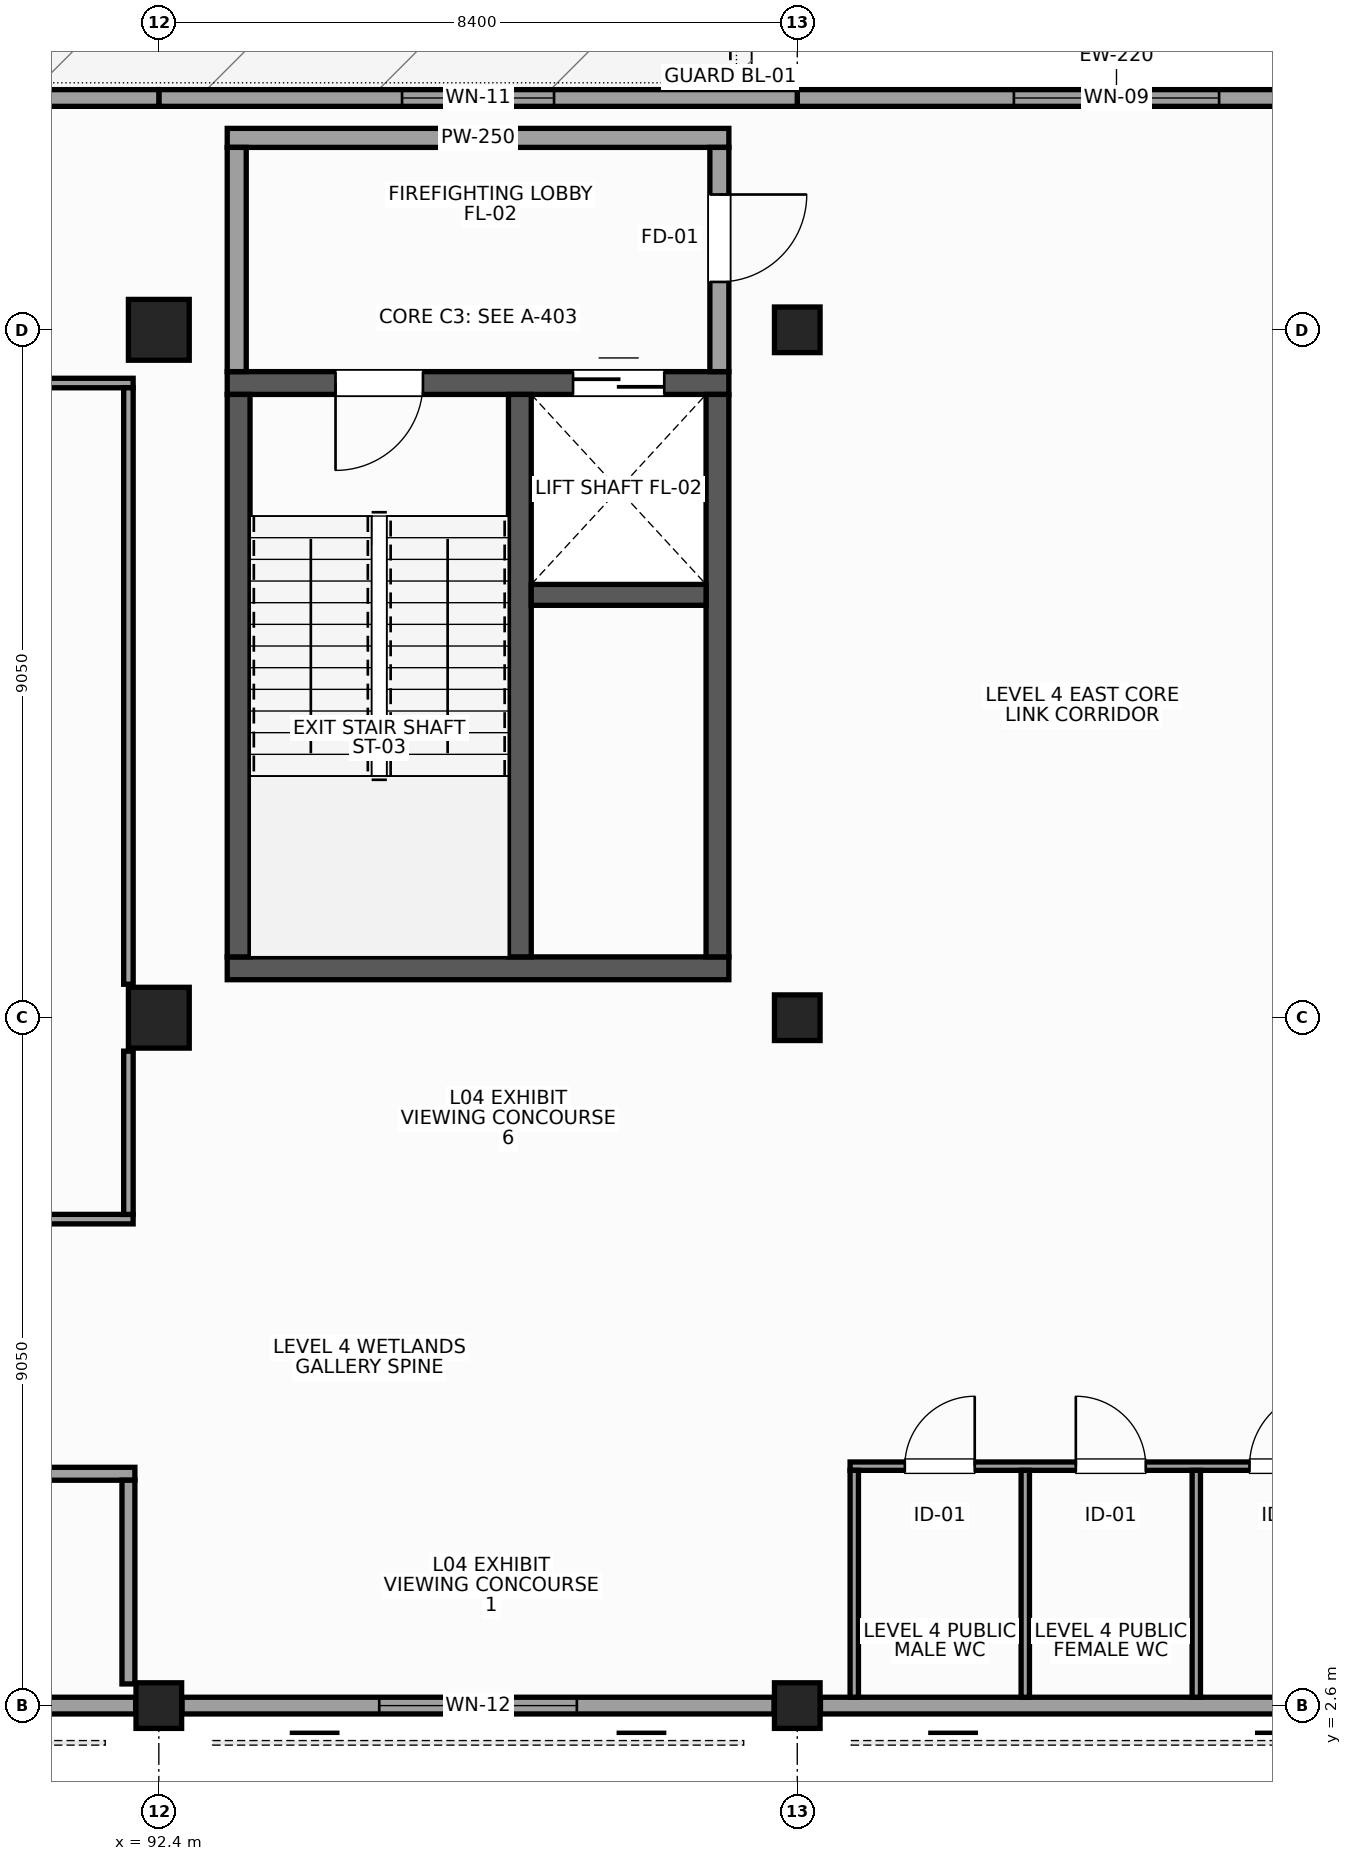
"""IFC4 building model, lengths in metres.
Left out: names, types, materials, properties, quantities, classifications, styles, units other than length and angle.
Written with IfcOpenShell. Run it as: python <this file> out.ifc"""

import sys

from ifc_helpers import new_model, si_unit, direction, frame, frame_2d, origin, origin_2d, place, context, subcontext, project, spatial, rectangle, extrude, element, fill, save


model = new_model("IFC4")
c1 = context("Model", 3, precision=1e-05, world=origin(), true_north=direction((0.0, 1.0)))
c2 = subcontext(c1, "Body", "Model", "MODEL_VIEW")
j1 = project(units=[si_unit("LENGTHUNIT", "METRE"), si_unit("PLANEANGLEUNIT", "RADIAN")], contexts=[c1])
p1 = place(None, origin())
s1 = spatial("IfcSite", under=j1, at=p1, CompositionType="ELEMENT")
p2 = place(p1, origin())
s2 = spatial("IfcBuilding", under=s1, at=p2, CompositionType="ELEMENT")
p3 = place(p2, frame((0.0, 0.0, 20.1)))
s3 = spatial("IfcBuildingStorey", under=s2, at=p3, CompositionType="ELEMENT", Elevation=20.1)
p4 = place(p3, frame((92.4, 2.6, 0.0), z_axis=(0.0, 0.0, 1.0), x_axis=(1.0, 0.0, 0.0)))
e1 = element("IfcColumn", 1, at=p4, inside=s3, PredefinedType="COLUMN", context=c2, shape_type="SweptSolid", body=[
    extrude(rectangle(XDim=0.6, YDim=0.6, at=origin_2d()), origin(), (0.0, 0.0, 1.0), 4.5),
])
p5 = place(p3, frame((92.4, 11.65, 0.0), z_axis=(0.0, 0.0, 1.0), x_axis=(1.0, 0.0, 0.0)))
e2 = element("IfcColumn", 2, at=p5, inside=s3, PredefinedType="COLUMN", context=c2, shape_type="SweptSolid", body=[
    extrude(rectangle(XDim=0.8, YDim=0.8, at=origin_2d()), origin(), (0.0, 0.0, 1.0), 3.75),
])
p6 = place(p3, frame((92.4, 20.7, 0.0), z_axis=(0.0, 0.0, 1.0), x_axis=(1.0, 0.0, 0.0)))
e3 = element("IfcColumn", 3, at=p6, inside=s3, PredefinedType="COLUMN", context=c2, shape_type="SweptSolid", body=[
    extrude(rectangle(XDim=0.8, YDim=0.8, at=origin_2d()), origin(), (0.0, 0.0, 1.0), 4.2),
])
for number, where, z_axis, x_axis in (
    (4, (100.8, 2.6, 0.0), (0.0, 0.0, 1.0), (1.0, 0.0, 0.0)),
    (5, (100.8, 11.65, 0.0), (0.0, 0.0, 1.0), (1.0, 0.0, 0.0)),
    (6, (100.8, 20.7, 0.0), (0.0, 0.0, 1.0), (1.0, 0.0, 0.0)),
):
    element("IfcColumn", number, at=place(p3, frame(where, z_axis=z_axis, x_axis=x_axis)), inside=s3, PredefinedType="COLUMN", context=c2, shape_type="SweptSolid", body=[
        extrude(rectangle(XDim=0.6, YDim=0.6, at=origin_2d()), origin(), (0.0, 0.0, 1.0), 4.5),
    ])
p7 = place(p3, frame((84.305, 2.6, 0.0), z_axis=(0.0, 0.0, 1.0), x_axis=(1.0, 0.0, 0.0)))
e7 = element("IfcWall", 7, at=p7, inside=s3, PredefinedType="STANDARD", context=c2, shape_type="SweptSolid", body=[
    extrude(rectangle(XDim=7.79, YDim=0.22, at=frame_2d((3.895, 0.0))), origin(), (0.0, 0.0, 1.0), 4.2),
])
p8 = place(p7, frame((3.195, 0.0, 0.95)))
e8 = element("IfcOpeningElement", 8, at=p8, cuts=e7, PredefinedType="OPENING", context=c2, shape_type="SweptSolid", body=[
    extrude(rectangle(XDim=1.4, YDim=1.6, at=frame_2d((0.7, 0.8))), frame((0.0, 0.12, 0.0), z_axis=(0.0, -1.0, 0.0), x_axis=(1.0, 0.0, 0.0)), (0.0, 0.0, 1.0), 0.24),
])
p9 = place(p3, frame((92.705, 2.6, 0.0), z_axis=(0.0, 0.0, 1.0), x_axis=(1.0, 0.0, 0.0)))
e9 = element("IfcWall", 9, at=p9, inside=s3, PredefinedType="STANDARD", context=c2, shape_type="SweptSolid", body=[
    extrude(rectangle(XDim=7.79, YDim=0.22, at=frame_2d((3.895, 0.0))), origin(), (0.0, 0.0, 1.0), 4.2),
])
p10 = place(p9, frame((2.595, 0.0, 0.95)))
e10 = element("IfcOpeningElement", 10, at=p10, cuts=e9, PredefinedType="OPENING", context=c2, shape_type="SweptSolid", body=[
    extrude(rectangle(XDim=2.6, YDim=1.6, at=frame_2d((1.3, 0.8))), frame((0.0, 0.12, 0.0), z_axis=(0.0, -1.0, 0.0), x_axis=(1.0, 0.0, 0.0)), (0.0, 0.0, 1.0), 0.24),
])
p11 = place(p3, frame((101.105, 2.6, 0.0), z_axis=(0.0, 0.0, 1.0), x_axis=(1.0, 0.0, 0.0)))
e11 = element("IfcWall", 11, at=p11, inside=s3, PredefinedType="STANDARD", context=c2, shape_type="SweptSolid", body=[
    extrude(rectangle(XDim=7.79, YDim=0.22, at=frame_2d((3.895, 0.0))), origin(), (0.0, 0.0, 1.0), 3.631),
])
p12 = place(p3, frame((109.2, 23.75, 0.0), z_axis=(0.0, 0.0, 1.0), x_axis=(-1.0, 0.0, 0.0)))
e12 = element("IfcWall", 12, at=p12, inside=s3, PredefinedType="STANDARD", context=c2, shape_type="SweptSolid", body=[
    extrude(rectangle(XDim=8.4, YDim=0.22, at=frame_2d((4.2, 0.0))), origin(), (0.0, 0.0, 1.0), 3.428),
])
p13 = place(p12, frame((2.85, 0.0, 0.95)))
e13 = element("IfcOpeningElement", 13, at=p13, cuts=e12, PredefinedType="OPENING", context=c2, shape_type="SweptSolid", body=[
    extrude(rectangle(XDim=2.7, YDim=2.0, at=frame_2d((1.35, 1.0))), frame((0.0, 0.12, 0.0), z_axis=(0.0, -1.0, 0.0), x_axis=(1.0, 0.0, 0.0)), (0.0, 0.0, 1.0), 0.24),
])
p14 = place(p3, frame((100.8, 23.75, 0.0), z_axis=(0.0, 0.0, 1.0), x_axis=(-1.0, 0.0, 0.0)))
e14 = element("IfcWall", 14, at=p14, inside=s3, PredefinedType="STANDARD", context=c2, shape_type="SweptSolid", body=[
    extrude(rectangle(XDim=8.4, YDim=0.22, at=frame_2d((4.2, 0.0))), origin(), (0.0, 0.0, 1.0), 3.428),
])
p15 = place(p14, frame((3.2, 0.0, 0.95)))
e15 = element("IfcOpeningElement", 15, at=p15, cuts=e14, PredefinedType="OPENING", context=c2, shape_type="SweptSolid", body=[
    extrude(rectangle(XDim=2.0, YDim=1.5, at=frame_2d((1.0, 0.75))), frame((0.0, 0.12, 0.0), z_axis=(0.0, -1.0, 0.0), x_axis=(1.0, 0.0, 0.0)), (0.0, 0.0, 1.0), 0.24),
])
p16 = place(p3, frame((92.4, 23.75, 0.0), z_axis=(0.0, 0.0, 1.0), x_axis=(-1.0, 0.0, 0.0)))
e16 = element("IfcWall", 16, at=p16, inside=s3, PredefinedType="STANDARD", context=c2, shape_type="SweptSolid", body=[
    extrude(rectangle(XDim=8.4, YDim=0.22, at=frame_2d((4.2, 0.0))), origin(), (0.0, 0.0, 1.0), 3.428),
])
p17 = place(p16, frame((3.4, 0.0, 0.0)))
e17 = element("IfcOpeningElement", 17, at=p17, cuts=e16, PredefinedType="OPENING", context=c2, shape_type="SweptSolid", body=[
    extrude(rectangle(XDim=1.6, YDim=2.25, at=frame_2d((0.8, 1.125))), frame((0.0, 0.12, 0.0), z_axis=(0.0, -1.0, 0.0), x_axis=(1.0, 0.0, 0.0)), (0.0, 0.0, 1.0), 0.24),
])
p18 = place(p3, frame((93.3, 12.3, 0.0), z_axis=(0.0, 0.0, 1.0), x_axis=(1.0, 0.0, 0.0)))
e18 = element("IfcWall", 18, at=p18, inside=s3, PredefinedType="SHEAR", context=c2, shape_type="SweptSolid", body=[
    extrude(rectangle(XDim=6.6, YDim=0.3, at=frame_2d((3.3, 0.0))), origin(), (0.0, 0.0, 1.0), 4.2),
])
p19 = place(p3, frame((93.3, 20.0, 0.0), z_axis=(0.0, 0.0, 1.0), x_axis=(1.0, 0.0, 0.0)))
e19 = element("IfcWall", 19, at=p19, inside=s3, PredefinedType="SHEAR", context=c2, shape_type="SweptSolid", body=[
    extrude(rectangle(XDim=6.6, YDim=0.3, at=frame_2d((3.3, 0.0))), origin(), (0.0, 0.0, 1.0), 4.2),
])
p20 = place(p19, frame((1.425, 0.0, 0.0)))
e20 = element("IfcOpeningElement", 20, at=p20, cuts=e19, PredefinedType="OPENING", context=c2, shape_type="SweptSolid", body=[
    extrude(rectangle(XDim=1.15, YDim=2.2, at=frame_2d((0.575, 1.1))), frame((0.0, 0.16, 0.0), z_axis=(0.0, -1.0, 0.0), x_axis=(1.0, 0.0, 0.0)), (0.0, 0.0, 1.0), 0.32),
])
p21 = place(p19, frame((4.55, 0.0, 0.0)))
e21 = element("IfcOpeningElement", 21, at=p21, cuts=e19, PredefinedType="OPENING", context=c2, shape_type="SweptSolid", body=[
    extrude(rectangle(XDim=1.2, YDim=2.15, at=frame_2d((0.6, 1.075))), frame((0.0, 0.16, 0.0), z_axis=(0.0, -1.0, 0.0), x_axis=(1.0, 0.0, 0.0)), (0.0, 0.0, 1.0), 0.32),
])
for number, where, z_axis, x_axis in (
    (22, (93.45, 12.45, 0.0), (0.0, 0.0, 1.0), (0.0, 1.0, 0.0)),
    (23, (99.75, 12.45, 0.0), (0.0, 0.0, 1.0), (0.0, 1.0, 0.0)),
    (24, (97.15, 12.45, 0.0), (0.0, 0.0, 1.0), (0.0, 1.0, 0.0)),
):
    element("IfcWall", number, at=place(p3, frame(where, z_axis=z_axis, x_axis=x_axis)), inside=s3, PredefinedType="SHEAR", context=c2, shape_type="SweptSolid", body=[
        extrude(rectangle(XDim=7.4, YDim=0.3, at=frame_2d((3.7, 0.0))), origin(), (0.0, 0.0, 1.0), 4.2),
    ])
p22 = place(p3, frame((97.3, 17.213, 0.0), z_axis=(0.0, 0.0, 1.0), x_axis=(1.0, 0.0, 0.0)))
e25 = element("IfcWall", 25, at=p22, inside=s3, PredefinedType="SHEAR", context=c2, shape_type="SweptSolid", body=[
    extrude(rectangle(XDim=2.3, YDim=0.275, at=frame_2d((1.15, 0.0))), origin(), (0.0, 0.0, 1.0), 4.2),
])
p23 = place(p3, frame((93.3, 23.225, 0.0), z_axis=(0.0, 0.0, 1.0), x_axis=(1.0, 0.0, 0.0)))
e26 = element("IfcWall", 26, at=p23, inside=s3, PredefinedType="PARTITIONING", context=c2, shape_type="SweptSolid", body=[
    extrude(rectangle(XDim=6.6, YDim=0.25, at=frame_2d((3.3, 0.0))), origin(), (0.0, 0.0, 1.0), 4.2),
])
p24 = place(p3, frame((93.425, 20.15, 0.0), z_axis=(0.0, 0.0, 1.0), x_axis=(0.0, 1.0, 0.0)))
e27 = element("IfcWall", 27, at=p24, inside=s3, PredefinedType="PARTITIONING", context=c2, shape_type="SweptSolid", body=[
    extrude(rectangle(XDim=2.95, YDim=0.25, at=frame_2d((1.475, 0.0))), origin(), (0.0, 0.0, 1.0), 4.2),
])
p25 = place(p3, frame((99.775, 20.15, 0.0), z_axis=(0.0, 0.0, 1.0), x_axis=(0.0, 1.0, 0.0)))
e28 = element("IfcWall", 28, at=p25, inside=s3, PredefinedType="PARTITIONING", context=c2, shape_type="SweptSolid", body=[
    extrude(rectangle(XDim=2.95, YDim=0.25, at=frame_2d((1.475, 0.0))), origin(), (0.0, 0.0, 1.0), 3.783),
])
p26 = place(p25, frame((1.18, 0.0, 0.0)))
e29 = element("IfcOpeningElement", 29, at=p26, cuts=e28, PredefinedType="OPENING", context=c2, shape_type="SweptSolid", body=[
    extrude(rectangle(XDim=1.15, YDim=2.2, at=frame_2d((0.575, 1.1))), frame((0.0, 0.135, 0.0), z_axis=(0.0, -1.0, 0.0), x_axis=(1.0, 0.0, 0.0)), (0.0, 0.0, 1.0), 0.27),
])
p27 = place(p3, frame((101.495, 5.75, 0.0), z_axis=(0.0, 0.0, 1.0), x_axis=(1.0, 0.0, 0.0)))
e30 = element("IfcWall", 30, at=p27, inside=s3, PredefinedType="PARTITIONING", context=c2, shape_type="SweptSolid", body=[
    extrude(rectangle(XDim=7.01, YDim=0.11, at=frame_2d((3.505, 0.0))), origin(), (0.0, 0.0, 1.0), 3.631),
])
p28 = place(p27, frame((0.72, 0.0, 0.0)))
e31 = element("IfcOpeningElement", 31, at=p28, cuts=e30, PredefinedType="OPENING", context=c2, shape_type="SweptSolid", body=[
    extrude(rectangle(XDim=0.92, YDim=2.1, at=frame_2d((0.46, 1.05))), frame((0.0, 0.065, 0.0), z_axis=(0.0, -1.0, 0.0), x_axis=(1.0, 0.0, 0.0)), (0.0, 0.0, 1.0), 0.13),
])
p29 = place(p27, frame((2.97, 0.0, 0.0)))
e32 = element("IfcOpeningElement", 32, at=p29, cuts=e30, PredefinedType="OPENING", context=c2, shape_type="SweptSolid", body=[
    extrude(rectangle(XDim=0.92, YDim=2.1, at=frame_2d((0.46, 1.05))), frame((0.0, 0.065, 0.0), z_axis=(0.0, -1.0, 0.0), x_axis=(1.0, 0.0, 0.0)), (0.0, 0.0, 1.0), 0.13),
])
p30 = place(p27, frame((5.255, 0.0, 0.0)))
e33 = element("IfcOpeningElement", 33, at=p30, cuts=e30, PredefinedType="OPENING", context=c2, shape_type="SweptSolid", body=[
    extrude(rectangle(XDim=1.0, YDim=2.15, at=frame_2d((0.5, 1.075))), frame((0.0, 0.065, 0.0), z_axis=(0.0, -1.0, 0.0), x_axis=(1.0, 0.0, 0.0)), (0.0, 0.0, 1.0), 0.13),
])
for number, where, z_axis, x_axis in (
    (34, (101.55, 2.71, 0.0), (0.0, 0.0, 1.0), (0.0, 1.0, 0.0)),
    (35, (103.8, 2.71, 0.0), (0.0, 0.0, 1.0), (0.0, 1.0, 0.0)),
    (36, (106.05, 2.71, 0.0), (0.0, 0.0, 1.0), (0.0, 1.0, 0.0)),
):
    element("IfcWall", number, at=place(p3, frame(where, z_axis=z_axis, x_axis=x_axis)), inside=s3, PredefinedType="PARTITIONING", context=c2, shape_type="SweptSolid", body=[
        extrude(rectangle(XDim=2.985, YDim=0.11, at=frame_2d((1.493, 0.0))), origin(), (0.0, 0.0, 1.0), 3.631),
    ])
p31 = place(p3, frame((70.138, 9.0, 0.0), z_axis=(0.0, 0.0, 1.0), x_axis=(1.0, 0.0, 0.0)))
e37 = element("IfcWall", 37, at=p31, inside=s3, PredefinedType="PARTITIONING", context=c2, shape_type="SweptSolid", body=[
    extrude(rectangle(XDim=21.924, YDim=0.125, at=frame_2d((10.962, 0.0))), origin(), (0.0, 0.0, 1.0), 4.2),
])
p32 = place(p31, frame((10.292, 0.0, 0.0)))
e38 = element("IfcOpeningElement", 38, at=p32, cuts=e37, PredefinedType="OPENING", context=c2, shape_type="SweptSolid", body=[
    extrude(rectangle(XDim=1.34, YDim=2.32, at=frame_2d((0.67, 1.16))), frame((0.0, 0.073, 0.0), z_axis=(0.0, -1.0, 0.0), x_axis=(1.0, 0.0, 0.0)), (0.0, 0.0, 1.0), 0.145),
])
p33 = place(p31, frame((12.232, 0.0, 1.05)))
e39 = element("IfcOpeningElement", 39, at=p33, cuts=e37, PredefinedType="OPENING", context=c2, shape_type="SweptSolid", body=[
    extrude(rectangle(XDim=2.25, YDim=1.6, at=frame_2d((1.125, 0.8))), frame((0.0, 0.073, 0.0), z_axis=(0.0, -1.0, 0.0), x_axis=(1.0, 0.0, 0.0)), (0.0, 0.0, 1.0), 0.145),
])
p34 = place(p3, frame((70.138, 20.0, 0.0), z_axis=(0.0, 0.0, 1.0), x_axis=(1.0, 0.0, 0.0)))
e40 = element("IfcWall", 40, at=p34, inside=s3, PredefinedType="PARTITIONING", context=c2, shape_type="SweptSolid", body=[
    extrude(rectangle(XDim=21.924, YDim=0.125, at=frame_2d((10.962, 0.0))), origin(), (0.0, 0.0, 1.0), 3.428),
])
p35 = place(p3, frame((92.0, 9.062, 0.0), z_axis=(0.0, 0.0, 1.0), x_axis=(0.0, 1.0, 0.0)))
e41 = element("IfcWall", 41, at=p35, inside=s3, PredefinedType="PARTITIONING", context=c2, shape_type="SweptSolid", body=[
    extrude(rectangle(XDim=2.148, YDim=0.125, at=frame_2d((1.074, 0.0))), origin(), (0.0, 0.0, 1.0), 4.2),
])
p36 = place(p3, frame((92.0, 12.09, 0.0), z_axis=(0.0, 0.0, 1.0), x_axis=(0.0, 1.0, 0.0)))
e42 = element("IfcWall", 42, at=p36, inside=s3, PredefinedType="PARTITIONING", context=c2, shape_type="SweptSolid", body=[
    extrude(rectangle(XDim=7.848, YDim=0.125, at=frame_2d((3.924, 0.0))), origin(), (0.0, 0.0, 1.0), 3.783),
])
p37 = place(p3, frame((67.515, 5.65, 0.0), z_axis=(0.0, 0.0, 1.0), x_axis=(1.0, 0.0, 0.0)))
e43 = element("IfcWall", 43, at=p37, inside=s3, PredefinedType="PARTITIONING", context=c2, shape_type="SweptSolid", body=[
    extrude(rectangle(XDim=24.57, YDim=0.17, at=frame_2d((12.285, 0.0))), origin(), (0.0, 0.0, 1.0), 4.2),
])
p38 = place(p37, frame((11.575, 0.0, 0.0)))
e44 = element("IfcOpeningElement", 44, at=p38, cuts=e43, PredefinedType="OPENING", context=c2, shape_type="SweptSolid", body=[
    extrude(rectangle(XDim=1.42, YDim=2.38, at=frame_2d((0.71, 1.19))), frame((0.0, 0.095, 0.0), z_axis=(0.0, -1.0, 0.0), x_axis=(1.0, 0.0, 0.0)), (0.0, 0.0, 1.0), 0.19),
])
p39 = place(p37, frame((13.595, 0.0, 1.05)))
e45 = element("IfcOpeningElement", 45, at=p39, cuts=e43, PredefinedType="OPENING", context=c2, shape_type="SweptSolid", body=[
    extrude(rectangle(XDim=2.55, YDim=1.2, at=frame_2d((1.275, 0.6))), frame((0.0, 0.095, 0.0), z_axis=(0.0, -1.0, 0.0), x_axis=(1.0, 0.0, 0.0)), (0.0, 0.0, 1.0), 0.19),
])
p40 = place(p3, frame((92.0, 2.885, 0.0), z_axis=(0.0, 0.0, 1.0), x_axis=(0.0, 1.0, 0.0)))
e46 = element("IfcWall", 46, at=p40, inside=s3, PredefinedType="PARTITIONING", context=c2, shape_type="SweptSolid", body=[
    extrude(rectangle(XDim=2.68, YDim=0.17, at=frame_2d((1.34, 0.0))), origin(), (0.0, 0.0, 1.0), 4.2),
])
p41 = place(p10, origin())
e47 = element("IfcWindow", 47, at=p41, inside=s3, PartitioningType="SINGLE_PANEL", PredefinedType="WINDOW", context=c2, shape_type="SweptSolid", body=[
    extrude(rectangle(XDim=2.6, YDim=1.6, at=frame_2d((1.3, 0.8))), frame((0.0, 0.03, 0.0), z_axis=(0.0, -1.0, 0.0), x_axis=(1.0, 0.0, 0.0)), (0.0, 0.0, 1.0), 0.06),
])
fill(e10, e47)
p42 = place(p13, origin())
e48 = element("IfcWindow", 48, at=p42, inside=s3, PartitioningType="SINGLE_PANEL", PredefinedType="WINDOW", context=c2, shape_type="SweptSolid", body=[
    extrude(rectangle(XDim=2.7, YDim=2.0, at=frame_2d((1.35, 1.0))), frame((0.0, 0.03, 0.0), z_axis=(0.0, -1.0, 0.0), x_axis=(1.0, 0.0, 0.0)), (0.0, 0.0, 1.0), 0.06),
])
fill(e13, e48)
p43 = place(p15, origin())
e49 = element("IfcWindow", 49, at=p43, inside=s3, PartitioningType="SINGLE_PANEL", PredefinedType="WINDOW", context=c2, shape_type="SweptSolid", body=[
    extrude(rectangle(XDim=2.0, YDim=1.5, at=frame_2d((1.0, 0.75))), frame((0.0, 0.03, 0.0), z_axis=(0.0, -1.0, 0.0), x_axis=(1.0, 0.0, 0.0)), (0.0, 0.0, 1.0), 0.06),
])
fill(e15, e49)
p44 = place(p20, frame((1.15, 0.0, 0.0), z_axis=(0.0, 0.0, 1.0), x_axis=(-1.0, 0.0, 0.0)))
e50 = element("IfcDoor", 50, at=p44, inside=s3, OperationType="SINGLE_SWING_RIGHT", PredefinedType="DOOR", context=c2, shape_type="SweptSolid", body=[
    extrude(rectangle(XDim=1.15, YDim=2.2, at=frame_2d((0.575, 1.1))), frame((0.0, 0.025, 0.0), z_axis=(0.0, -1.0, 0.0), x_axis=(1.0, 0.0, 0.0)), (0.0, 0.0, 1.0), 0.05),
])
fill(e20, e50)
p45 = place(p21, origin())
e51 = element("IfcDoor", 51, at=p45, inside=s3, OperationType="DOUBLE_DOOR_SLIDING", PredefinedType="DOOR", context=c2, shape_type="SweptSolid", body=[
    extrude(rectangle(XDim=1.2, YDim=2.15, at=frame_2d((0.6, 1.075))), frame((0.0, 0.025, 0.0), z_axis=(0.0, -1.0, 0.0), x_axis=(1.0, 0.0, 0.0)), (0.0, 0.0, 1.0), 0.05),
])
fill(e21, e51)
p46 = place(p26, frame((1.15, 0.0, 0.0), z_axis=(0.0, 0.0, 1.0), x_axis=(-1.0, 0.0, 0.0)))
e52 = element("IfcDoor", 52, at=p46, inside=s3, OperationType="SINGLE_SWING_LEFT", PredefinedType="DOOR", context=c2, shape_type="SweptSolid", body=[
    extrude(rectangle(XDim=1.15, YDim=2.2, at=frame_2d((0.575, 1.1))), frame((0.0, 0.025, 0.0), z_axis=(0.0, -1.0, 0.0), x_axis=(1.0, 0.0, 0.0)), (0.0, 0.0, 1.0), 0.05),
])
fill(e29, e52)
p47 = place(p28, origin())
e53 = element("IfcDoor", 53, at=p47, inside=s3, OperationType="SINGLE_SWING_RIGHT", PredefinedType="DOOR", context=c2, shape_type="SweptSolid", body=[
    extrude(rectangle(XDim=0.92, YDim=2.1, at=frame_2d((0.46, 1.05))), frame((0.0, 0.025, 0.0), z_axis=(0.0, -1.0, 0.0), x_axis=(1.0, 0.0, 0.0)), (0.0, 0.0, 1.0), 0.05),
])
fill(e31, e53)
p48 = place(p29, origin())
e54 = element("IfcDoor", 54, at=p48, inside=s3, OperationType="SINGLE_SWING_LEFT", PredefinedType="DOOR", context=c2, shape_type="SweptSolid", body=[
    extrude(rectangle(XDim=0.92, YDim=2.1, at=frame_2d((0.46, 1.05))), frame((0.0, 0.025, 0.0), z_axis=(0.0, -1.0, 0.0), x_axis=(1.0, 0.0, 0.0)), (0.0, 0.0, 1.0), 0.05),
])
fill(e32, e54)
p49 = place(p30, origin())
e55 = element("IfcDoor", 55, at=p49, inside=s3, OperationType="SINGLE_SWING_RIGHT", PredefinedType="DOOR", context=c2, shape_type="SweptSolid", body=[
    extrude(rectangle(XDim=1.0, YDim=2.15, at=frame_2d((0.5, 1.075))), frame((0.0, 0.025, 0.0), z_axis=(0.0, -1.0, 0.0), x_axis=(1.0, 0.0, 0.0)), (0.0, 0.0, 1.0), 0.05),
])
fill(e33, e55)
save(model, sys.argv[1])
